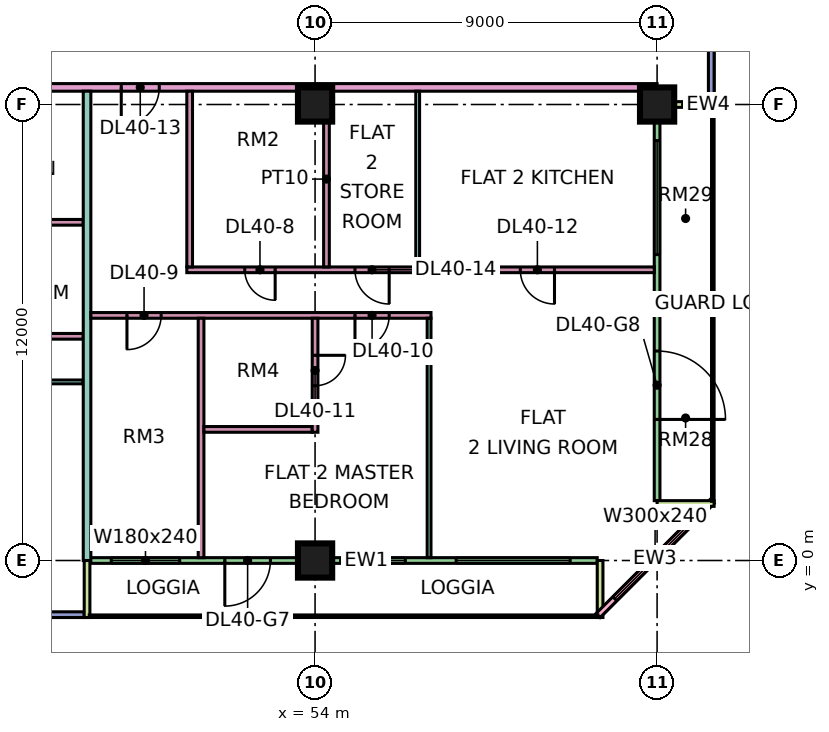
"""IFC4 building model, lengths in metres.
Left out: names, types, materials, properties, quantities, classifications, styles, units other than length and angle.
Written with IfcOpenShell. Run it as: python <this file> out.ifc"""

import sys

from ifc_helpers import new_model, si_unit, direction, frame, frame_2d, origin, origin_2d, place, context, subcontext, project, spatial, rectangle, extrude, element, fill, save


model = new_model("IFC4")
c1 = context("Model", 3, precision=1e-05, world=origin(), true_north=direction((0.0, 1.0)))
c2 = subcontext(c1, "Body", "Model", "MODEL_VIEW")
j1 = project(units=[si_unit("LENGTHUNIT", "METRE"), si_unit("PLANEANGLEUNIT", "RADIAN")], contexts=[c1])
p1 = place(None, origin())
s1 = spatial("IfcSite", under=j1, at=p1, CompositionType="ELEMENT")
p2 = place(p1, origin())
s2 = spatial("IfcBuilding", under=s1, at=p2, CompositionType="ELEMENT")
p3 = place(p2, frame((0.0, 0.0, 176.15)))
s3 = spatial("IfcBuildingStorey", under=s2, at=p3, CompositionType="ELEMENT", Elevation=176.15)
for number, where, z_axis, x_axis in (
    (1, (54.0, 0.0, 0.0), (0.0, 0.0, 1.0), (1.0, 0.0, 0.0)),
    (2, (54.0, 12.0, 0.0), (0.0, 0.0, 1.0), (1.0, 0.0, 0.0)),
    (3, (63.0, 12.0, 0.0), (0.0, 0.0, 1.0), (1.0, 0.0, 0.0)),
):
    element("IfcColumn", number, at=place(p3, frame(where, z_axis=z_axis, x_axis=x_axis)), inside=s3, PredefinedType="COLUMN", context=c2, shape_type="SweptSolid", body=[
        extrude(rectangle(XDim=0.9, YDim=0.9, at=origin_2d()), origin(), (0.0, 0.0, 1.0), 3.75),
    ])
p4 = place(p3, frame((36.075, -1.425, 0.0), z_axis=(0.0, 0.0, 1.0), x_axis=(1.0, 0.0, 0.0)))
e4 = element("IfcWall", 4, at=p4, inside=s3, PredefinedType="SOLIDWALL", context=c2, shape_type="SweptSolid", body=[
    extrude(rectangle(XDim=11.85, YDim=0.15, at=frame_2d((5.925, 0.0))), origin(), (0.0, 0.0, 1.0), 3.35),
])
p5 = place(p4, frame((0.562, 0.0, 0.45)))
e5 = element("IfcOpeningElement", 5, at=p5, cuts=e4, PredefinedType="OPENING", context=c2, shape_type="SweptSolid", body=[
    extrude(rectangle(XDim=1.8, YDim=2.4, at=frame_2d((0.9, 1.2))), frame((0.0, 0.085, 0.0), z_axis=(0.0, -1.0, 0.0), x_axis=(1.0, 0.0, 0.0)), (0.0, 0.0, 1.0), 0.17),
])
p6 = place(p4, frame((5.887, 0.0, 0.45)))
e6 = element("IfcOpeningElement", 6, at=p6, cuts=e4, PredefinedType="OPENING", context=c2, shape_type="SweptSolid", body=[
    extrude(rectangle(XDim=3.0, YDim=2.4, at=frame_2d((1.5, 1.2))), frame((0.0, 0.085, 0.0), z_axis=(0.0, -1.0, 0.0), x_axis=(1.0, 0.0, 0.0)), (0.0, 0.0, 1.0), 0.17),
])
p7 = place(p3, frame((48.075, 0.0, 0.0), z_axis=(0.0, 0.0, 1.0), x_axis=(1.0, 0.0, 0.0)))
e7 = element("IfcWall", 7, at=p7, inside=s3, PredefinedType="SOLIDWALL", context=c2, shape_type="SweptSolid", body=[
    extrude(rectangle(XDim=13.35, YDim=0.15, at=frame_2d((6.675, 0.0))), origin(), (0.0, 0.0, 1.0), 3.35),
])
p8 = place(p7, frame((0.562, 0.0, 0.45)))
e8 = element("IfcOpeningElement", 8, at=p8, cuts=e7, PredefinedType="OPENING", context=c2, shape_type="SweptSolid", body=[
    extrude(rectangle(XDim=1.8, YDim=2.4, at=frame_2d((0.9, 1.2))), frame((0.0, 0.085, 0.0), z_axis=(0.0, -1.0, 0.0), x_axis=(1.0, 0.0, 0.0)), (0.0, 0.0, 1.0), 0.17),
])
p9 = place(p7, frame((3.55, 0.0, 0.0)))
e9 = element("IfcOpeningElement", 9, at=p9, cuts=e7, PredefinedType="OPENING", context=c2, shape_type="SweptSolid", body=[
    extrude(rectangle(XDim=1.2, YDim=2.4, at=frame_2d((0.6, 1.2))), frame((0.0, 0.085, 0.0), z_axis=(0.0, -1.0, 0.0), x_axis=(1.0, 0.0, 0.0)), (0.0, 0.0, 1.0), 0.17),
])
p10 = place(p7, frame((7.1, 0.0, 0.45)))
e10 = element("IfcOpeningElement", 10, at=p10, cuts=e7, PredefinedType="OPENING", context=c2, shape_type="SweptSolid", body=[
    extrude(rectangle(XDim=1.2, YDim=2.4, at=frame_2d((0.6, 1.2))), frame((0.0, 0.085, 0.0), z_axis=(0.0, -1.0, 0.0), x_axis=(1.0, 0.0, 0.0)), (0.0, 0.0, 1.0), 0.17),
])
p11 = place(p7, frame((9.637, 0.0, 0.45)))
e11 = element("IfcOpeningElement", 11, at=p11, cuts=e7, PredefinedType="OPENING", context=c2, shape_type="SweptSolid", body=[
    extrude(rectangle(XDim=3.0, YDim=2.4, at=frame_2d((1.5, 1.2))), frame((0.0, 0.085, 0.0), z_axis=(0.0, -1.0, 0.0), x_axis=(1.0, 0.0, 0.0)), (0.0, 0.0, 1.0), 0.17),
])
for number, where, z_axis, x_axis in (
    (12, (48.0, -1.5, 0.0), (0.0, 0.0, 1.0), (0.0, 1.0, 0.0)),
    (13, (61.5, -1.5, 0.0), (0.0, 0.0, 1.0), (0.0, 1.0, 0.0)),
):
    element("IfcWall", number, at=place(p3, frame(where, z_axis=z_axis, x_axis=x_axis)), inside=s3, PredefinedType="SOLIDWALL", context=c2, shape_type="SweptSolid", body=[
        extrude(rectangle(XDim=1.5, YDim=0.15, at=frame_2d((0.75, 0.0))), origin(), (0.0, 0.0, 1.0), 3.35),
    ])
p12 = place(p3, frame((61.447, -1.447, 0.0), z_axis=(0.0, 0.0, 1.0), x_axis=(0.707106781187, 0.707106781187, 0.0)))
e14 = element("IfcWall", 14, at=p12, inside=s3, PredefinedType="SOLIDWALL", context=c2, shape_type="SweptSolid", body=[
    extrude(rectangle(XDim=4.243, YDim=0.15, at=frame_2d((2.121, 0.0))), origin(), (0.0, 0.0, 1.0), 3.35),
])
p13 = place(p12, frame((0.621, 0.0, 0.45)))
e15 = element("IfcOpeningElement", 15, at=p13, cuts=e14, PredefinedType="OPENING", context=c2, shape_type="SweptSolid", body=[
    extrude(rectangle(XDim=3.0, YDim=2.4, at=frame_2d((1.5, 1.2))), frame((0.0, 0.085, 0.0), z_axis=(0.0, -1.0, 0.0), x_axis=(1.0, 0.0, 0.0)), (0.0, 0.0, 1.0), 0.17),
])
p14 = place(p3, frame((63.0, 1.575, 0.0), z_axis=(0.0, 0.0, 1.0), x_axis=(0.0, 1.0, 0.0)))
e16 = element("IfcWall", 16, at=p14, inside=s3, PredefinedType="SOLIDWALL", context=c2, shape_type="SweptSolid", body=[
    extrude(rectangle(XDim=10.35, YDim=0.15, at=frame_2d((5.175, 0.0))), origin(), (0.0, 0.0, 1.0), 3.35),
])
p15 = place(p14, frame((2.137, 0.0, 0.0)))
e17 = element("IfcOpeningElement", 17, at=p15, cuts=e16, PredefinedType="OPENING", context=c2, shape_type="SweptSolid", body=[
    extrude(rectangle(XDim=1.8, YDim=2.4, at=frame_2d((0.9, 1.2))), frame((0.0, 0.085, 0.0), z_axis=(0.0, -1.0, 0.0), x_axis=(1.0, 0.0, 0.0)), (0.0, 0.0, 1.0), 0.17),
])
p16 = place(p14, frame((6.475, 0.0, 0.45)))
e18 = element("IfcOpeningElement", 18, at=p16, cuts=e16, PredefinedType="OPENING", context=c2, shape_type="SweptSolid", body=[
    extrude(rectangle(XDim=3.0, YDim=2.4, at=frame_2d((1.5, 1.2))), frame((0.0, 0.085, 0.0), z_axis=(0.0, -1.0, 0.0), x_axis=(1.0, 0.0, 0.0)), (0.0, 0.0, 1.0), 0.17),
])
for number, where, z_axis, x_axis in (
    (19, (64.5, 1.5, 0.0), (0.0, 0.0, 1.0), (-1.0, 0.0, 0.0)),
    (20, (64.5, 12.0, 0.0), (0.0, 0.0, 1.0), (-1.0, 0.0, 0.0)),
):
    element("IfcWall", number, at=place(p3, frame(where, z_axis=z_axis, x_axis=x_axis)), inside=s3, PredefinedType="SOLIDWALL", context=c2, shape_type="SweptSolid", body=[
        extrude(rectangle(XDim=1.5, YDim=0.15, at=frame_2d((0.75, 0.0))), origin(), (0.0, 0.0, 1.0), 3.35),
    ])
p17 = place(p3, frame((64.425, 12.075, 0.0), z_axis=(0.0, 0.0, 1.0), x_axis=(0.0, 1.0, 0.0)))
e21 = element("IfcWall", 21, at=p17, inside=s3, PredefinedType="SOLIDWALL", context=c2, shape_type="SweptSolid", body=[
    extrude(rectangle(XDim=10.425, YDim=0.15, at=frame_2d((5.212, 0.0))), origin(), (0.0, 0.0, 1.0), 3.35),
])
p18 = place(p17, frame((6.375, 0.0, 0.45)))
e22 = element("IfcOpeningElement", 22, at=p18, cuts=e21, PredefinedType="OPENING", context=c2, shape_type="SweptSolid", body=[
    extrude(rectangle(XDim=0.9, YDim=2.4, at=frame_2d((0.45, 1.2))), frame((0.0, 0.085, 0.0), z_axis=(0.0, -1.0, 0.0), x_axis=(1.0, 0.0, 0.0)), (0.0, 0.0, 1.0), 0.17),
])
p19 = place(p17, frame((8.175, 0.0, 0.45)))
e23 = element("IfcOpeningElement", 23, at=p19, cuts=e21, PredefinedType="OPENING", context=c2, shape_type="SweptSolid", body=[
    extrude(rectangle(XDim=1.8, YDim=2.4, at=frame_2d((0.9, 1.2))), frame((0.0, 0.085, 0.0), z_axis=(0.0, -1.0, 0.0), x_axis=(1.0, 0.0, 0.0)), (0.0, 0.0, 1.0), 0.17),
])
p20 = place(p3, frame((33.05, 4.7, 0.0), z_axis=(0.0, 0.0, 1.0), x_axis=(1.0, 0.0, 0.0)))
e24 = element("IfcWall", 24, at=p20, inside=s3, PredefinedType="PARTITIONING", context=c2, shape_type="SweptSolid", body=[
    extrude(rectangle(XDim=14.85, YDim=0.1, at=frame_2d((7.425, 0.0))), origin(), (0.0, 0.0, 1.0), 3.35),
])
p21 = place(p20, frame((1.0, 0.0, 0.0)))
e25 = element("IfcOpeningElement", 25, at=p21, cuts=e24, PredefinedType="OPENING", context=c2, shape_type="SweptSolid", body=[
    extrude(rectangle(XDim=0.9, YDim=2.1, at=frame_2d((0.45, 1.05))), frame((0.0, 0.06, 0.0), z_axis=(0.0, -1.0, 0.0), x_axis=(1.0, 0.0, 0.0)), (0.0, 0.0, 1.0), 0.12),
])
p22 = place(p20, frame((4.0, 0.0, 0.0)))
e26 = element("IfcOpeningElement", 26, at=p22, cuts=e24, PredefinedType="OPENING", context=c2, shape_type="SweptSolid", body=[
    extrude(rectangle(XDim=0.9, YDim=2.1, at=frame_2d((0.45, 1.05))), frame((0.0, 0.06, 0.0), z_axis=(0.0, -1.0, 0.0), x_axis=(1.0, 0.0, 0.0)), (0.0, 0.0, 1.0), 0.12),
])
p23 = place(p20, frame((10.0, 0.0, 0.0)))
e27 = element("IfcOpeningElement", 27, at=p23, cuts=e24, PredefinedType="OPENING", context=c2, shape_type="SweptSolid", body=[
    extrude(rectangle(XDim=0.9, YDim=2.1, at=frame_2d((0.45, 1.05))), frame((0.0, 0.06, 0.0), z_axis=(0.0, -1.0, 0.0), x_axis=(1.0, 0.0, 0.0)), (0.0, 0.0, 1.0), 0.12),
])
p24 = place(p3, frame((40.65, 12.45, 0.0), z_axis=(0.0, 0.0, 1.0), x_axis=(1.0, 0.0, 0.0)))
e28 = element("IfcWall", 28, at=p24, inside=s3, PredefinedType="PARTITIONING", context=c2, shape_type="SweptSolid", body=[
    extrude(rectangle(XDim=22.35, YDim=0.2, at=frame_2d((11.175, 0.0))), origin(), (0.0, 0.0, 1.0), 3.35),
])
p25 = place(p24, frame((8.25, 0.0, 0.0)))
e29 = element("IfcOpeningElement", 29, at=p25, cuts=e28, PredefinedType="OPENING", context=c2, shape_type="SweptSolid", body=[
    extrude(rectangle(XDim=1.0, YDim=2.1, at=frame_2d((0.5, 1.05))), frame((0.0, 0.11, 0.0), z_axis=(0.0, -1.0, 0.0), x_axis=(1.0, 0.0, 0.0)), (0.0, 0.0, 1.0), 0.22),
])
p26 = place(p24, frame((1.05, 0.0, 0.0)))
e30 = element("IfcOpeningElement", 30, at=p26, cuts=e28, PredefinedType="OPENING", context=c2, shape_type="SweptSolid", body=[
    extrude(rectangle(XDim=1.0, YDim=2.1, at=frame_2d((0.5, 1.05))), frame((0.0, 0.11, 0.0), z_axis=(0.0, -1.0, 0.0), x_axis=(1.0, 0.0, 0.0)), (0.0, 0.0, 1.0), 0.22),
])
p27 = place(p3, frame((43.725, 5.9, 0.0), z_axis=(0.0, 0.0, 1.0), x_axis=(1.0, 0.0, 0.0)))
e31 = element("IfcWall", 31, at=p27, inside=s3, PredefinedType="PARTITIONING", context=c2, shape_type="SweptSolid", body=[
    extrude(rectangle(XDim=4.175, YDim=0.15, at=frame_2d((2.087, 0.0))), origin(), (0.0, 0.0, 1.0), 3.35),
])
p28 = place(p27, frame((1.675, 0.0, 0.0)))
e32 = element("IfcOpeningElement", 32, at=p28, cuts=e31, PredefinedType="OPENING", context=c2, shape_type="SweptSolid", body=[
    extrude(rectangle(XDim=0.8, YDim=2.1, at=frame_2d((0.4, 1.05))), frame((0.0, 0.085, 0.0), z_axis=(0.0, -1.0, 0.0), x_axis=(1.0, 0.0, 0.0)), (0.0, 0.0, 1.0), 0.17),
])
p29 = place(p3, frame((43.725, 8.9, 0.0), z_axis=(0.0, 0.0, 1.0), x_axis=(1.0, 0.0, 0.0)))
e33 = element("IfcWall", 33, at=p29, inside=s3, PredefinedType="PARTITIONING", context=c2, shape_type="SweptSolid", body=[
    extrude(rectangle(XDim=4.175, YDim=0.15, at=frame_2d((2.087, 0.0))), origin(), (0.0, 0.0, 1.0), 3.35),
])
p30 = place(p3, frame((48.0, 0.0, 0.0), z_axis=(0.0, 0.0, 1.0), x_axis=(0.0, 1.0, 0.0)))
e34 = element("IfcWall", 34, at=p30, inside=s3, PredefinedType="PARTITIONING", context=c2, shape_type="SweptSolid", body=[
    extrude(rectangle(XDim=12.35, YDim=0.2, at=frame_2d((6.175, 0.0))), origin(), (0.0, 0.0, 1.0), 3.35),
])
p31 = place(p3, frame((48.1, 6.45, 0.0), z_axis=(0.0, 0.0, 1.0), x_axis=(1.0, 0.0, 0.0)))
e35 = element("IfcWall", 35, at=p31, inside=s3, PredefinedType="PARTITIONING", context=c2, shape_type="SweptSolid", body=[
    extrude(rectangle(XDim=8.95, YDim=0.15, at=frame_2d((4.475, 0.0))), origin(), (0.0, 0.0, 1.0), 3.35),
])
p32 = place(p31, frame((0.95, 0.0, 0.0)))
e36 = element("IfcOpeningElement", 36, at=p32, cuts=e35, PredefinedType="OPENING", context=c2, shape_type="SweptSolid", body=[
    extrude(rectangle(XDim=0.9, YDim=2.1, at=frame_2d((0.45, 1.05))), frame((0.0, 0.085, 0.0), z_axis=(0.0, -1.0, 0.0), x_axis=(1.0, 0.0, 0.0)), (0.0, 0.0, 1.0), 0.17),
])
p33 = place(p31, frame((6.95, 0.0, 0.0)))
e37 = element("IfcOpeningElement", 37, at=p33, cuts=e35, PredefinedType="OPENING", context=c2, shape_type="SweptSolid", body=[
    extrude(rectangle(XDim=0.9, YDim=2.1, at=frame_2d((0.45, 1.05))), frame((0.0, 0.085, 0.0), z_axis=(0.0, -1.0, 0.0), x_axis=(1.0, 0.0, 0.0)), (0.0, 0.0, 1.0), 0.17),
])
p34 = place(p3, frame((50.625, 7.65, 0.0), z_axis=(0.0, 0.0, 1.0), x_axis=(1.0, 0.0, 0.0)))
e38 = element("IfcWall", 38, at=p34, inside=s3, PredefinedType="PARTITIONING", context=c2, shape_type="SweptSolid", body=[
    extrude(rectangle(XDim=12.301, YDim=0.15, at=frame_2d((6.15, 0.0))), origin(), (0.0, 0.0, 1.0), 3.35),
])
p35 = place(p34, frame((1.525, 0.0, 0.0)))
e39 = element("IfcOpeningElement", 39, at=p35, cuts=e38, PredefinedType="OPENING", context=c2, shape_type="SweptSolid", body=[
    extrude(rectangle(XDim=0.8, YDim=2.1, at=frame_2d((0.4, 1.05))), frame((0.0, 0.085, 0.0), z_axis=(0.0, -1.0, 0.0), x_axis=(1.0, 0.0, 0.0)), (0.0, 0.0, 1.0), 0.17),
])
p36 = place(p34, frame((8.775, 0.0, 0.0)))
e40 = element("IfcOpeningElement", 40, at=p36, cuts=e38, PredefinedType="OPENING", context=c2, shape_type="SweptSolid", body=[
    extrude(rectangle(XDim=0.9, YDim=2.1, at=frame_2d((0.45, 1.05))), frame((0.0, 0.085, 0.0), z_axis=(0.0, -1.0, 0.0), x_axis=(1.0, 0.0, 0.0)), (0.0, 0.0, 1.0), 0.17),
])
p37 = place(p34, frame((4.425, 0.0, 0.0)))
e41 = element("IfcOpeningElement", 41, at=p37, cuts=e38, PredefinedType="OPENING", context=c2, shape_type="SweptSolid", body=[
    extrude(rectangle(XDim=0.9, YDim=2.1, at=frame_2d((0.45, 1.05))), frame((0.0, 0.085, 0.0), z_axis=(0.0, -1.0, 0.0), x_axis=(1.0, 0.0, 0.0)), (0.0, 0.0, 1.0), 0.17),
])
p38 = place(p3, frame((50.7, 7.725, 0.0), z_axis=(0.0, 0.0, 1.0), x_axis=(0.0, 1.0, 0.0)))
e42 = element("IfcWall", 42, at=p38, inside=s3, PredefinedType="PARTITIONING", context=c2, shape_type="SweptSolid", body=[
    extrude(rectangle(XDim=4.625, YDim=0.15, at=frame_2d((2.312, 0.0))), origin(), (0.0, 0.0, 1.0), 3.35),
])
p39 = place(p3, frame((51.0, 0.074, 0.0), z_axis=(0.0, 0.0, 1.0), x_axis=(0.0, 1.0, 0.0)))
e43 = element("IfcWall", 43, at=p39, inside=s3, PredefinedType="PARTITIONING", context=c2, shape_type="SweptSolid", body=[
    extrude(rectangle(XDim=6.301, YDim=0.15, at=frame_2d((3.15, 0.0))), origin(), (0.0, 0.0, 1.0), 3.35),
])
p40 = place(p3, frame((51.075, 3.45, 0.0), z_axis=(0.0, 0.0, 1.0), x_axis=(1.0, 0.0, 0.0)))
e44 = element("IfcWall", 44, at=p40, inside=s3, PredefinedType="PARTITIONING", context=c2, shape_type="SweptSolid", body=[
    extrude(rectangle(XDim=2.85, YDim=0.15, at=frame_2d((1.425, 0.0))), origin(), (0.0, 0.0, 1.0), 3.35),
])
p41 = place(p3, frame((54.0, 3.375, 0.0), z_axis=(0.0, 0.0, 1.0), x_axis=(0.0, 1.0, 0.0)))
e45 = element("IfcWall", 45, at=p41, inside=s3, PredefinedType="PARTITIONING", context=c2, shape_type="SweptSolid", body=[
    extrude(rectangle(XDim=3.0, YDim=0.15, at=frame_2d((1.5, 0.0))), origin(), (0.0, 0.0, 1.0), 3.35),
])
p42 = place(p41, frame((1.225, 0.0, 0.0)))
e46 = element("IfcOpeningElement", 46, at=p42, cuts=e45, PredefinedType="OPENING", context=c2, shape_type="SweptSolid", body=[
    extrude(rectangle(XDim=0.8, YDim=2.1, at=frame_2d((0.4, 1.05))), frame((0.0, 0.085, 0.0), z_axis=(0.0, -1.0, 0.0), x_axis=(1.0, 0.0, 0.0)), (0.0, 0.0, 1.0), 0.17),
])
p43 = place(p3, frame((54.3, 7.725, 0.0), z_axis=(0.0, 0.0, 1.0), x_axis=(0.0, 1.0, 0.0)))
e47 = element("IfcWall", 47, at=p43, inside=s3, PredefinedType="PARTITIONING", context=c2, shape_type="SweptSolid", body=[
    extrude(rectangle(XDim=4.625, YDim=0.15, at=frame_2d((2.312, 0.0))), origin(), (0.0, 0.0, 1.0), 3.35),
])
p44 = place(p3, frame((56.7, 7.725, 0.0), z_axis=(0.0, 0.0, 1.0), x_axis=(0.0, 1.0, 0.0)))
e48 = element("IfcWall", 48, at=p44, inside=s3, PredefinedType="PARTITIONING", context=c2, shape_type="SweptSolid", body=[
    extrude(rectangle(XDim=4.625, YDim=0.1, at=frame_2d((2.312, 0.0))), origin(), (0.0, 0.0, 1.0), 3.35),
])
p45 = place(p3, frame((57.0, 0.074, 0.0), z_axis=(0.0, 0.0, 1.0), x_axis=(0.0, 1.0, 0.0)))
e49 = element("IfcWall", 49, at=p45, inside=s3, PredefinedType="PARTITIONING", context=c2, shape_type="SweptSolid", body=[
    extrude(rectangle(XDim=6.301, YDim=0.1, at=frame_2d((3.15, 0.0))), origin(), (0.0, 0.0, 1.0), 3.35),
])
p46 = place(p8, origin())
e50 = element("IfcWindow", 50, at=p46, inside=s3, PartitioningType="SINGLE_PANEL", PredefinedType="WINDOW", context=c2, shape_type="SweptSolid", body=[
    extrude(rectangle(XDim=1.8, YDim=2.4, at=frame_2d((0.9, 1.2))), frame((0.0, 0.03, 0.0), z_axis=(0.0, -1.0, 0.0), x_axis=(1.0, 0.0, 0.0)), (0.0, 0.0, 1.0), 0.06),
])
fill(e8, e50)
p47 = place(p9, frame((1.2, 0.0, 0.0), z_axis=(0.0, 0.0, 1.0), x_axis=(-1.0, 0.0, 0.0)))
e51 = element("IfcDoor", 51, at=p47, inside=s3, OperationType="DOUBLE_DOOR_SINGLE_SWING", PredefinedType="DOOR", context=c2, shape_type="SweptSolid", body=[
    extrude(rectangle(XDim=1.2, YDim=2.4, at=frame_2d((0.6, 1.2))), frame((0.0, 0.025, 0.0), z_axis=(0.0, -1.0, 0.0), x_axis=(1.0, 0.0, 0.0)), (0.0, 0.0, 1.0), 0.05),
])
fill(e9, e51)
p48 = place(p10, origin())
e52 = element("IfcWindow", 52, at=p48, inside=s3, PartitioningType="SINGLE_PANEL", PredefinedType="WINDOW", context=c2, shape_type="SweptSolid", body=[
    extrude(rectangle(XDim=1.2, YDim=2.4, at=frame_2d((0.6, 1.2))), frame((0.0, 0.03, 0.0), z_axis=(0.0, -1.0, 0.0), x_axis=(1.0, 0.0, 0.0)), (0.0, 0.0, 1.0), 0.06),
])
fill(e10, e52)
p49 = place(p11, origin())
e53 = element("IfcWindow", 53, at=p49, inside=s3, PartitioningType="SINGLE_PANEL", PredefinedType="WINDOW", context=c2, shape_type="SweptSolid", body=[
    extrude(rectangle(XDim=3.0, YDim=2.4, at=frame_2d((1.5, 1.2))), frame((0.0, 0.03, 0.0), z_axis=(0.0, -1.0, 0.0), x_axis=(1.0, 0.0, 0.0)), (0.0, 0.0, 1.0), 0.06),
])
fill(e11, e53)
p50 = place(p13, origin())
e54 = element("IfcWindow", 54, at=p50, inside=s3, PartitioningType="SINGLE_PANEL", PredefinedType="WINDOW", context=c2, shape_type="SweptSolid", body=[
    extrude(rectangle(XDim=3.0, YDim=2.4, at=frame_2d((1.5, 1.2))), frame((0.0, 0.03, 0.0), z_axis=(0.0, -1.0, 0.0), x_axis=(1.0, 0.0, 0.0)), (0.0, 0.0, 1.0), 0.06),
])
fill(e15, e54)
p51 = place(p15, frame((1.8, 0.0, 0.0), z_axis=(0.0, 0.0, 1.0), x_axis=(-1.0, 0.0, 0.0)))
e55 = element("IfcDoor", 55, at=p51, inside=s3, OperationType="DOUBLE_DOOR_SINGLE_SWING", PredefinedType="DOOR", context=c2, shape_type="SweptSolid", body=[
    extrude(rectangle(XDim=1.8, YDim=2.4, at=frame_2d((0.9, 1.2))), frame((0.0, 0.025, 0.0), z_axis=(0.0, -1.0, 0.0), x_axis=(1.0, 0.0, 0.0)), (0.0, 0.0, 1.0), 0.05),
])
fill(e17, e55)
p52 = place(p16, origin())
e56 = element("IfcWindow", 56, at=p52, inside=s3, PartitioningType="SINGLE_PANEL", PredefinedType="WINDOW", context=c2, shape_type="SweptSolid", body=[
    extrude(rectangle(XDim=3.0, YDim=2.4, at=frame_2d((1.5, 1.2))), frame((0.0, 0.03, 0.0), z_axis=(0.0, -1.0, 0.0), x_axis=(1.0, 0.0, 0.0)), (0.0, 0.0, 1.0), 0.06),
])
fill(e18, e56)
p53 = place(p35, origin())
e57 = element("IfcDoor", 57, at=p53, inside=s3, OperationType="SINGLE_SWING_RIGHT", PredefinedType="DOOR", context=c2, shape_type="SweptSolid", body=[
    extrude(rectangle(XDim=0.8, YDim=2.1, at=frame_2d((0.4, 1.05))), frame((0.0, 0.025, 0.0), z_axis=(0.0, -1.0, 0.0), x_axis=(1.0, 0.0, 0.0)), (0.0, 0.0, 1.0), 0.05),
])
fill(e39, e57)
p54 = place(p32, frame((0.9, 0.0, 0.0), z_axis=(0.0, 0.0, 1.0), x_axis=(-1.0, 0.0, 0.0)))
e58 = element("IfcDoor", 58, at=p54, inside=s3, OperationType="SINGLE_SWING_LEFT", PredefinedType="DOOR", context=c2, shape_type="SweptSolid", body=[
    extrude(rectangle(XDim=0.9, YDim=2.1, at=frame_2d((0.45, 1.05))), frame((0.0, 0.025, 0.0), z_axis=(0.0, -1.0, 0.0), x_axis=(1.0, 0.0, 0.0)), (0.0, 0.0, 1.0), 0.05),
])
fill(e36, e58)
p55 = place(p33, frame((0.9, 0.0, 0.0), z_axis=(0.0, 0.0, 1.0), x_axis=(-1.0, 0.0, 0.0)))
e59 = element("IfcDoor", 59, at=p55, inside=s3, OperationType="SINGLE_SWING_LEFT", PredefinedType="DOOR", context=c2, shape_type="SweptSolid", body=[
    extrude(rectangle(XDim=0.9, YDim=2.1, at=frame_2d((0.45, 1.05))), frame((0.0, 0.025, 0.0), z_axis=(0.0, -1.0, 0.0), x_axis=(1.0, 0.0, 0.0)), (0.0, 0.0, 1.0), 0.05),
])
fill(e37, e59)
p56 = place(p42, origin())
e60 = element("IfcDoor", 60, at=p56, inside=s3, OperationType="SINGLE_SWING_RIGHT", PredefinedType="DOOR", context=c2, shape_type="SweptSolid", body=[
    extrude(rectangle(XDim=0.8, YDim=2.1, at=frame_2d((0.4, 1.05))), frame((0.0, 0.025, 0.0), z_axis=(0.0, -1.0, 0.0), x_axis=(1.0, 0.0, 0.0)), (0.0, 0.0, 1.0), 0.05),
])
fill(e46, e60)
p57 = place(p36, origin())
e61 = element("IfcDoor", 61, at=p57, inside=s3, OperationType="SINGLE_SWING_RIGHT", PredefinedType="DOOR", context=c2, shape_type="SweptSolid", body=[
    extrude(rectangle(XDim=0.9, YDim=2.1, at=frame_2d((0.45, 1.05))), frame((0.0, 0.025, 0.0), z_axis=(0.0, -1.0, 0.0), x_axis=(1.0, 0.0, 0.0)), (0.0, 0.0, 1.0), 0.05),
])
fill(e40, e61)
p58 = place(p25, frame((1.0, 0.0, 0.0), z_axis=(0.0, 0.0, 1.0), x_axis=(-1.0, 0.0, 0.0)))
e62 = element("IfcDoor", 62, at=p58, inside=s3, OperationType="SINGLE_SWING_LEFT", PredefinedType="DOOR", context=c2, shape_type="SweptSolid", body=[
    extrude(rectangle(XDim=1.0, YDim=2.1, at=frame_2d((0.5, 1.05))), frame((0.0, 0.025, 0.0), z_axis=(0.0, -1.0, 0.0), x_axis=(1.0, 0.0, 0.0)), (0.0, 0.0, 1.0), 0.05),
])
fill(e29, e62)
p59 = place(p37, origin())
e63 = element("IfcDoor", 63, at=p59, inside=s3, OperationType="SINGLE_SWING_RIGHT", PredefinedType="DOOR", context=c2, shape_type="SweptSolid", body=[
    extrude(rectangle(XDim=0.9, YDim=2.1, at=frame_2d((0.45, 1.05))), frame((0.0, 0.025, 0.0), z_axis=(0.0, -1.0, 0.0), x_axis=(1.0, 0.0, 0.0)), (0.0, 0.0, 1.0), 0.05),
])
fill(e41, e63)
save(model, sys.argv[1])
